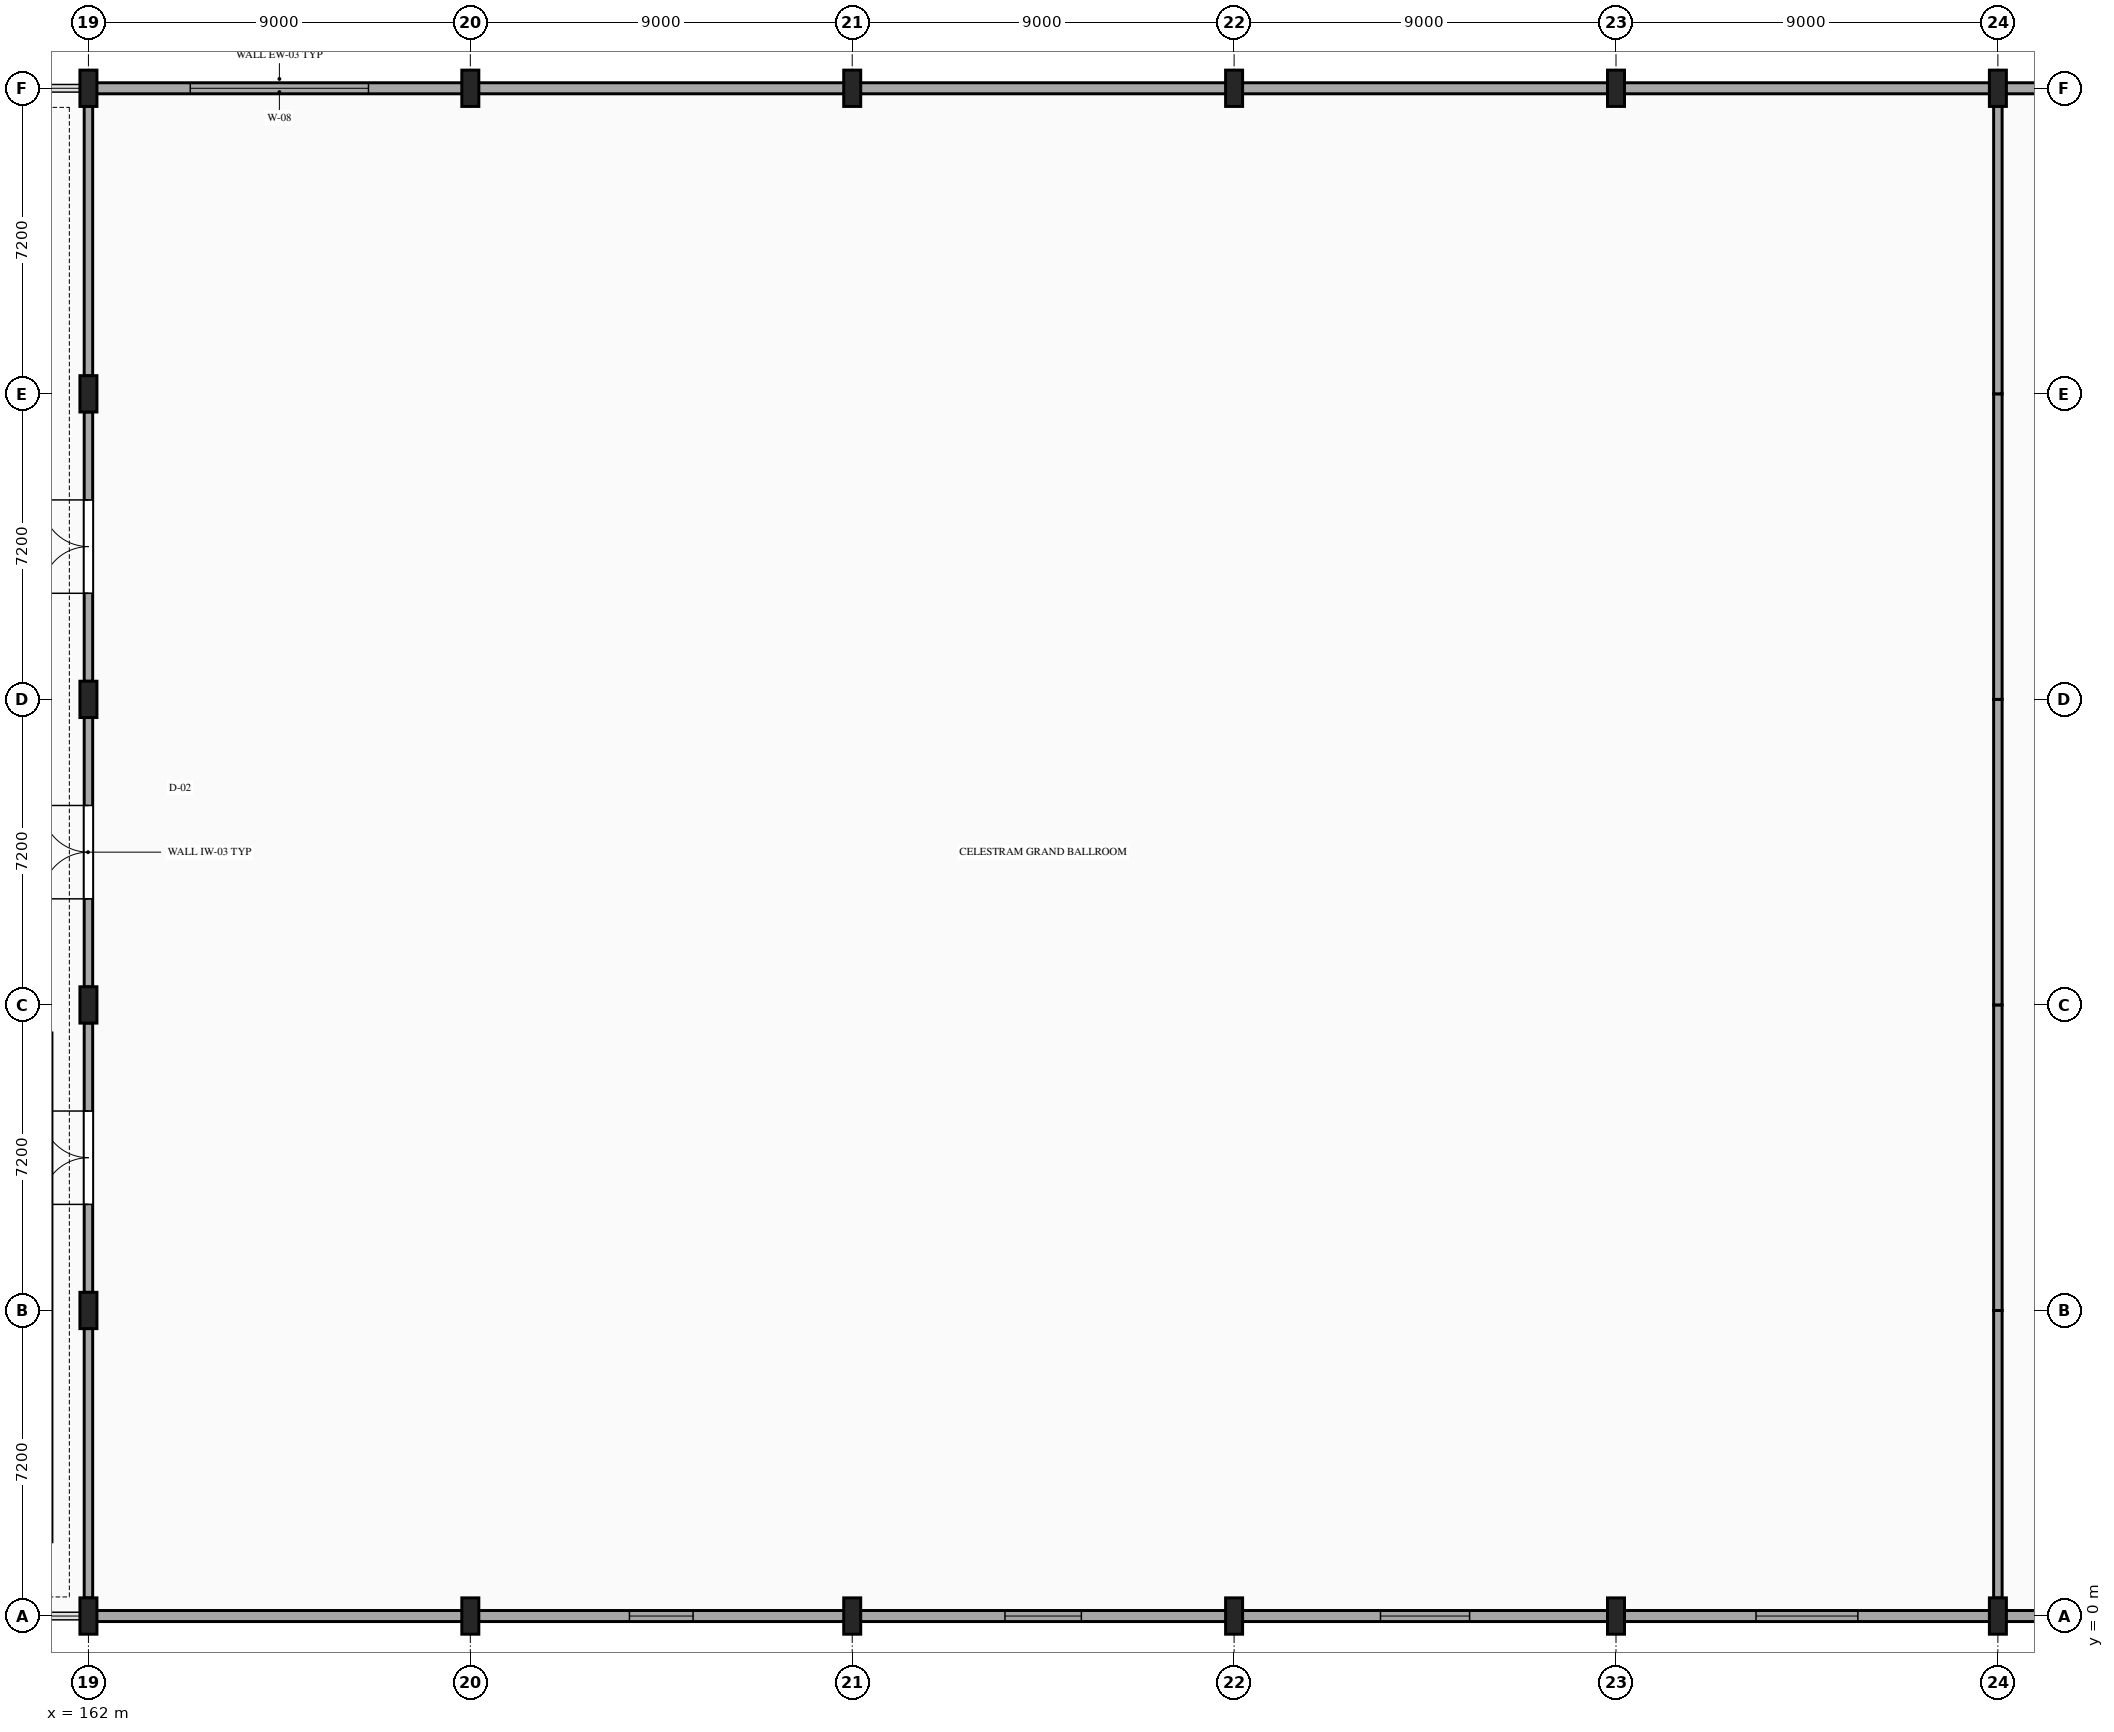
"""IFC4 building model, lengths in metres.
Left out: names, types, materials, properties, quantities, classifications, styles, units other than length and angle.
Written with IfcOpenShell. Run it as: python <this file> out.ifc"""

import sys

from ifc_helpers import new_model, si_unit, direction, frame, frame_2d, origin, origin_2d, place, context, subcontext, project, spatial, rectangle, i_section, extrude, element, fill, save


model = new_model("IFC4")
c1 = context("Model", 3, precision=1e-05, world=origin(), true_north=direction((0.0, 1.0)))
c2 = subcontext(c1, "Body", "Model", "MODEL_VIEW")
j1 = project(units=[si_unit("LENGTHUNIT", "METRE"), si_unit("PLANEANGLEUNIT", "RADIAN")], contexts=[c1])
p1 = place(None, origin())
s1 = spatial("IfcSite", under=j1, at=p1, CompositionType="ELEMENT")
p2 = place(p1, origin())
s2 = spatial("IfcBuilding", under=s1, at=p2, CompositionType="ELEMENT")
p3 = place(p2, frame((0.0, 0.0, 10.8)))
s3 = spatial("IfcBuildingStorey", under=s2, at=p3, CompositionType="ELEMENT", Elevation=10.8)
for number, where, z_axis, x_axis in (
    (1, (162.0, 0.0, 0.0), (0.0, 0.0, 1.0), (1.0, 0.0, 0.0)),
    (2, (162.0, 7.2, 0.0), (0.0, 0.0, 1.0), (1.0, 0.0, 0.0)),
    (3, (162.0, 14.4, 0.0), (0.0, 0.0, 1.0), (1.0, 0.0, 0.0)),
    (4, (162.0, 21.6, 0.0), (0.0, 0.0, 1.0), (1.0, 0.0, 0.0)),
    (5, (162.0, 28.8, 0.0), (0.0, 0.0, 1.0), (1.0, 0.0, 0.0)),
    (6, (162.0, 36.0, 0.0), (0.0, 0.0, 1.0), (1.0, 0.0, 0.0)),
    (7, (171.0, 0.0, 0.0), (0.0, 0.0, 1.0), (1.0, 0.0, 0.0)),
    (8, (171.0, 36.0, 0.0), (0.0, 0.0, 1.0), (1.0, 0.0, 0.0)),
    (9, (180.0, 0.0, 0.0), (0.0, 0.0, 1.0), (1.0, 0.0, 0.0)),
    (10, (180.0, 36.0, 0.0), (0.0, 0.0, 1.0), (1.0, 0.0, 0.0)),
    (11, (189.0, 0.0, 0.0), (0.0, 0.0, 1.0), (1.0, 0.0, 0.0)),
    (12, (189.0, 36.0, 0.0), (0.0, 0.0, 1.0), (1.0, 0.0, 0.0)),
    (13, (198.0, 0.0, 0.0), (0.0, 0.0, 1.0), (1.0, 0.0, 0.0)),
    (14, (198.0, 36.0, 0.0), (0.0, 0.0, 1.0), (1.0, 0.0, 0.0)),
    (15, (207.0, 0.0, 0.0), (0.0, 0.0, 1.0), (1.0, 0.0, 0.0)),
    (16, (207.0, 36.0, 0.0), (0.0, 0.0, 1.0), (1.0, 0.0, 0.0)),
):
    element("IfcColumn", number, at=place(p3, frame(where, z_axis=z_axis, x_axis=x_axis)), inside=s3, PredefinedType="COLUMN", context=c2, shape_type="SweptSolid", body=[
        extrude(i_section(OverallWidth=0.401, OverallDepth=0.856, WebThickness=0.018, FlangeThickness=0.029, at=origin_2d()), origin(), (0.0, 0.0, 1.0), 4.5),
    ])
p4 = place(p3, frame((160.97, 13.74, 0.0), z_axis=(0.0, 0.0, 1.0), x_axis=(0.0, -1.0, 0.0)))
e17 = element("IfcWall", 17, at=p4, inside=s3, PredefinedType="SHEAR", context=c2, shape_type="SweptSolid", body=[
    extrude(rectangle(XDim=11.99, YDim=0.34, at=frame_2d((5.995, 0.0))), origin(), (0.0, 0.0, 1.0), 4.26),
])
p5 = place(p3, frame((215.993, 0.0, 0.0), z_axis=(0.0, 0.0, 1.0), x_axis=(-1.0, 0.0, 0.0)))
e18 = element("IfcWall", 18, at=p5, inside=s3, PredefinedType="STANDARD", context=c2, shape_type="SweptSolid", body=[
    extrude(rectangle(XDim=8.986, YDim=0.26, at=frame_2d((4.493, 0.0))), origin(), (0.0, 0.0, 1.0), 3.336),
])
p6 = place(p5, frame((3.143, 0.0, 0.9)))
e19 = element("IfcOpeningElement", 19, at=p6, cuts=e18, PredefinedType="OPENING", context=c2, shape_type="SweptSolid", body=[
    extrude(rectangle(XDim=2.7, YDim=2.0, at=frame_2d((1.35, 1.0))), frame((0.0, 0.14, 0.0), z_axis=(0.0, -1.0, 0.0), x_axis=(1.0, 0.0, 0.0)), (0.0, 0.0, 1.0), 0.28),
])
p7 = place(p3, frame((206.993, 0.0, 0.0), z_axis=(0.0, 0.0, 1.0), x_axis=(-1.0, 0.0, 0.0)))
e20 = element("IfcWall", 20, at=p7, inside=s3, PredefinedType="STANDARD", context=c2, shape_type="SweptSolid", body=[
    extrude(rectangle(XDim=8.986, YDim=0.26, at=frame_2d((4.493, 0.0))), origin(), (0.0, 0.0, 1.0), 3.336),
])
p8 = place(p7, frame((3.293, 0.0, 0.9)))
e21 = element("IfcOpeningElement", 21, at=p8, cuts=e20, PredefinedType="OPENING", context=c2, shape_type="SweptSolid", body=[
    extrude(rectangle(XDim=2.4, YDim=2.0, at=frame_2d((1.2, 1.0))), frame((0.0, 0.14, 0.0), z_axis=(0.0, -1.0, 0.0), x_axis=(1.0, 0.0, 0.0)), (0.0, 0.0, 1.0), 0.28),
])
p9 = place(p3, frame((197.993, 0.0, 0.0), z_axis=(0.0, 0.0, 1.0), x_axis=(-1.0, 0.0, 0.0)))
e22 = element("IfcWall", 22, at=p9, inside=s3, PredefinedType="STANDARD", context=c2, shape_type="SweptSolid", body=[
    extrude(rectangle(XDim=8.986, YDim=0.26, at=frame_2d((4.493, 0.0))), origin(), (0.0, 0.0, 1.0), 3.336),
])
p10 = place(p9, frame((3.443, 0.0, 0.9)))
e23 = element("IfcOpeningElement", 23, at=p10, cuts=e22, PredefinedType="OPENING", context=c2, shape_type="SweptSolid", body=[
    extrude(rectangle(XDim=2.1, YDim=1.8, at=frame_2d((1.05, 0.9))), frame((0.0, 0.14, 0.0), z_axis=(0.0, -1.0, 0.0), x_axis=(1.0, 0.0, 0.0)), (0.0, 0.0, 1.0), 0.28),
])
p11 = place(p3, frame((188.993, 0.0, 0.0), z_axis=(0.0, 0.0, 1.0), x_axis=(-1.0, 0.0, 0.0)))
e24 = element("IfcWall", 24, at=p11, inside=s3, PredefinedType="STANDARD", context=c2, shape_type="SweptSolid", body=[
    extrude(rectangle(XDim=8.986, YDim=0.26, at=frame_2d((4.493, 0.0))), origin(), (0.0, 0.0, 1.0), 3.336),
])
p12 = place(p11, frame((3.593, 0.0, 0.9)))
e25 = element("IfcOpeningElement", 25, at=p12, cuts=e24, PredefinedType="OPENING", context=c2, shape_type="SweptSolid", body=[
    extrude(rectangle(XDim=1.8, YDim=1.8, at=frame_2d((0.9, 0.9))), frame((0.0, 0.14, 0.0), z_axis=(0.0, -1.0, 0.0), x_axis=(1.0, 0.0, 0.0)), (0.0, 0.0, 1.0), 0.28),
])
p13 = place(p3, frame((179.993, 0.0, 0.0), z_axis=(0.0, 0.0, 1.0), x_axis=(-1.0, 0.0, 0.0)))
e26 = element("IfcWall", 26, at=p13, inside=s3, PredefinedType="STANDARD", context=c2, shape_type="SweptSolid", body=[
    extrude(rectangle(XDim=8.986, YDim=0.26, at=frame_2d((4.493, 0.0))), origin(), (0.0, 0.0, 1.0), 3.336),
])
p14 = place(p13, frame((3.743, 0.0, 0.9)))
e27 = element("IfcOpeningElement", 27, at=p14, cuts=e26, PredefinedType="OPENING", context=c2, shape_type="SweptSolid", body=[
    extrude(rectangle(XDim=1.5, YDim=1.6, at=frame_2d((0.75, 0.8))), frame((0.0, 0.14, 0.0), z_axis=(0.0, -1.0, 0.0), x_axis=(1.0, 0.0, 0.0)), (0.0, 0.0, 1.0), 0.28),
])
p15 = place(p3, frame((170.993, 0.0, 0.0), z_axis=(0.0, 0.0, 1.0), x_axis=(-1.0, 0.0, 0.0)))
e28 = element("IfcWall", 28, at=p15, inside=s3, PredefinedType="STANDARD", context=c2, shape_type="SweptSolid", body=[
    extrude(rectangle(XDim=8.986, YDim=0.26, at=frame_2d((4.493, 0.0))), origin(), (0.0, 0.0, 1.0), 3.336),
])
p16 = place(p3, frame((162.007, 36.0, 0.0), z_axis=(0.0, 0.0, 1.0), x_axis=(1.0, 0.0, 0.0)))
e29 = element("IfcWall", 29, at=p16, inside=s3, PredefinedType="STANDARD", context=c2, shape_type="SweptSolid", body=[
    extrude(rectangle(XDim=8.986, YDim=0.26, at=frame_2d((4.493, 0.0))), origin(), (0.0, 0.0, 1.0), 3.336),
])
p17 = place(p16, frame((2.393, 0.0, 0.9)))
e30 = element("IfcOpeningElement", 30, at=p17, cuts=e29, PredefinedType="OPENING", context=c2, shape_type="SweptSolid", body=[
    extrude(rectangle(XDim=4.2, YDim=1.5, at=frame_2d((2.1, 0.75))), frame((0.0, 0.14, 0.0), z_axis=(0.0, -1.0, 0.0), x_axis=(1.0, 0.0, 0.0)), (0.0, 0.0, 1.0), 0.28),
])
for number, where, z_axis, x_axis in (
    (31, (171.007, 36.0, 0.0), (0.0, 0.0, 1.0), (1.0, 0.0, 0.0)),
    (32, (180.007, 36.0, 0.0), (0.0, 0.0, 1.0), (1.0, 0.0, 0.0)),
    (33, (189.007, 36.0, 0.0), (0.0, 0.0, 1.0), (1.0, 0.0, 0.0)),
    (34, (198.007, 36.0, 0.0), (0.0, 0.0, 1.0), (1.0, 0.0, 0.0)),
    (35, (207.007, 36.0, 0.0), (0.0, 0.0, 1.0), (1.0, 0.0, 0.0)),
):
    element("IfcWall", number, at=place(p3, frame(where, z_axis=z_axis, x_axis=x_axis)), inside=s3, PredefinedType="STANDARD", context=c2, shape_type="SweptSolid", body=[
        extrude(rectangle(XDim=8.986, YDim=0.26, at=frame_2d((4.493, 0.0))), origin(), (0.0, 0.0, 1.0), 3.336),
    ])
p18 = place(p3, frame((162.0, 0.426, 0.0), z_axis=(0.0, 0.0, 1.0), x_axis=(0.0, 1.0, 0.0)))
e36 = element("IfcWall", 36, at=p18, inside=s3, PredefinedType="PARTITIONING", context=c2, shape_type="SweptSolid", body=[
    extrude(rectangle(XDim=6.348, YDim=0.2, at=frame_2d((3.174, 0.0))), origin(), (0.0, 0.0, 1.0), 4.01),
])
p19 = place(p3, frame((162.0, 7.626, 0.0), z_axis=(0.0, 0.0, 1.0), x_axis=(0.0, 1.0, 0.0)))
e37 = element("IfcWall", 37, at=p19, inside=s3, PredefinedType="PARTITIONING", context=c2, shape_type="SweptSolid", body=[
    extrude(rectangle(XDim=6.348, YDim=0.2, at=frame_2d((3.174, 0.0))), origin(), (0.0, 0.0, 1.0), 4.01),
])
p20 = place(p19, frame((2.074, 0.0, 0.0)))
e38 = element("IfcOpeningElement", 38, at=p20, cuts=e37, PredefinedType="OPENING", context=c2, shape_type="SweptSolid", body=[
    extrude(rectangle(XDim=2.2, YDim=2.5, at=frame_2d((1.1, 1.25))), frame((0.0, 0.11, 0.0), z_axis=(0.0, -1.0, 0.0), x_axis=(1.0, 0.0, 0.0)), (0.0, 0.0, 1.0), 0.22),
])
p21 = place(p3, frame((162.0, 14.826, 0.0), z_axis=(0.0, 0.0, 1.0), x_axis=(0.0, 1.0, 0.0)))
e39 = element("IfcWall", 39, at=p21, inside=s3, PredefinedType="PARTITIONING", context=c2, shape_type="SweptSolid", body=[
    extrude(rectangle(XDim=6.348, YDim=0.2, at=frame_2d((3.174, 0.0))), origin(), (0.0, 0.0, 1.0), 4.01),
])
p22 = place(p21, frame((2.074, 0.0, 0.0)))
e40 = element("IfcOpeningElement", 40, at=p22, cuts=e39, PredefinedType="OPENING", context=c2, shape_type="SweptSolid", body=[
    extrude(rectangle(XDim=2.2, YDim=2.5, at=frame_2d((1.1, 1.25))), frame((0.0, 0.11, 0.0), z_axis=(0.0, -1.0, 0.0), x_axis=(1.0, 0.0, 0.0)), (0.0, 0.0, 1.0), 0.22),
])
p23 = place(p3, frame((162.0, 22.026, 0.0), z_axis=(0.0, 0.0, 1.0), x_axis=(0.0, 1.0, 0.0)))
e41 = element("IfcWall", 41, at=p23, inside=s3, PredefinedType="PARTITIONING", context=c2, shape_type="SweptSolid", body=[
    extrude(rectangle(XDim=6.348, YDim=0.2, at=frame_2d((3.174, 0.0))), origin(), (0.0, 0.0, 1.0), 4.01),
])
p24 = place(p23, frame((2.074, 0.0, 0.0)))
e42 = element("IfcOpeningElement", 42, at=p24, cuts=e41, PredefinedType="OPENING", context=c2, shape_type="SweptSolid", body=[
    extrude(rectangle(XDim=2.2, YDim=2.5, at=frame_2d((1.1, 1.25))), frame((0.0, 0.11, 0.0), z_axis=(0.0, -1.0, 0.0), x_axis=(1.0, 0.0, 0.0)), (0.0, 0.0, 1.0), 0.22),
])
p25 = place(p3, frame((162.0, 29.226, 0.0), z_axis=(0.0, 0.0, 1.0), x_axis=(0.0, 1.0, 0.0)))
e43 = element("IfcWall", 43, at=p25, inside=s3, PredefinedType="PARTITIONING", context=c2, shape_type="SweptSolid", body=[
    extrude(rectangle(XDim=6.348, YDim=0.2, at=frame_2d((3.174, 0.0))), origin(), (0.0, 0.0, 1.0), 4.01),
])
p26 = place(p3, frame((207.0, 0.426, 0.0), z_axis=(0.0, 0.0, 1.0), x_axis=(0.0, 1.0, 0.0)))
e44 = element("IfcWall", 44, at=p26, inside=s3, PredefinedType="PARTITIONING", context=c2, shape_type="SweptSolid", body=[
    extrude(rectangle(XDim=6.774, YDim=0.2, at=frame_2d((3.387, 0.0))), origin(), (0.0, 0.0, 1.0), 4.22),
])
p27 = place(p3, frame((207.0, 7.2, 0.0), z_axis=(0.0, 0.0, 1.0), x_axis=(0.0, 1.0, 0.0)))
e45 = element("IfcWall", 45, at=p27, inside=s3, PredefinedType="PARTITIONING", context=c2, shape_type="SweptSolid", body=[
    extrude(rectangle(XDim=7.2, YDim=0.2, at=frame_2d((3.6, 0.0))), origin(), (0.0, 0.0, 1.0), 4.22),
])
p28 = place(p3, frame((207.0, 14.4, 0.0), z_axis=(0.0, 0.0, 1.0), x_axis=(0.0, 1.0, 0.0)))
e46 = element("IfcWall", 46, at=p28, inside=s3, PredefinedType="PARTITIONING", context=c2, shape_type="SweptSolid", body=[
    extrude(rectangle(XDim=7.2, YDim=0.2, at=frame_2d((3.6, 0.0))), origin(), (0.0, 0.0, 1.0), 4.22),
])
p29 = place(p3, frame((207.0, 21.6, 0.0), z_axis=(0.0, 0.0, 1.0), x_axis=(0.0, 1.0, 0.0)))
e47 = element("IfcWall", 47, at=p29, inside=s3, PredefinedType="PARTITIONING", context=c2, shape_type="SweptSolid", body=[
    extrude(rectangle(XDim=7.2, YDim=0.2, at=frame_2d((3.6, 0.0))), origin(), (0.0, 0.0, 1.0), 4.22),
])
p30 = place(p3, frame((207.0, 28.8, 0.0), z_axis=(0.0, 0.0, 1.0), x_axis=(0.0, 1.0, 0.0)))
e48 = element("IfcWall", 48, at=p30, inside=s3, PredefinedType="PARTITIONING", context=c2, shape_type="SweptSolid", body=[
    extrude(rectangle(XDim=6.774, YDim=0.2, at=frame_2d((3.387, 0.0))), origin(), (0.0, 0.0, 1.0), 4.22),
])
p31 = place(p8, origin())
e49 = element("IfcWindow", 49, at=p31, inside=s3, PartitioningType="SINGLE_PANEL", PredefinedType="WINDOW", context=c2, shape_type="SweptSolid", body=[
    extrude(rectangle(XDim=2.4, YDim=2.0, at=frame_2d((1.2, 1.0))), frame((0.0, 0.03, 0.0), z_axis=(0.0, -1.0, 0.0), x_axis=(1.0, 0.0, 0.0)), (0.0, 0.0, 1.0), 0.06),
])
fill(e21, e49)
p32 = place(p10, origin())
e50 = element("IfcWindow", 50, at=p32, inside=s3, PartitioningType="SINGLE_PANEL", PredefinedType="WINDOW", context=c2, shape_type="SweptSolid", body=[
    extrude(rectangle(XDim=2.1, YDim=1.8, at=frame_2d((1.05, 0.9))), frame((0.0, 0.03, 0.0), z_axis=(0.0, -1.0, 0.0), x_axis=(1.0, 0.0, 0.0)), (0.0, 0.0, 1.0), 0.06),
])
fill(e23, e50)
p33 = place(p12, origin())
e51 = element("IfcWindow", 51, at=p33, inside=s3, PartitioningType="SINGLE_PANEL", PredefinedType="WINDOW", context=c2, shape_type="SweptSolid", body=[
    extrude(rectangle(XDim=1.8, YDim=1.8, at=frame_2d((0.9, 0.9))), frame((0.0, 0.03, 0.0), z_axis=(0.0, -1.0, 0.0), x_axis=(1.0, 0.0, 0.0)), (0.0, 0.0, 1.0), 0.06),
])
fill(e25, e51)
p34 = place(p14, origin())
e52 = element("IfcWindow", 52, at=p34, inside=s3, PartitioningType="SINGLE_PANEL", PredefinedType="WINDOW", context=c2, shape_type="SweptSolid", body=[
    extrude(rectangle(XDim=1.5, YDim=1.6, at=frame_2d((0.75, 0.8))), frame((0.0, 0.03, 0.0), z_axis=(0.0, -1.0, 0.0), x_axis=(1.0, 0.0, 0.0)), (0.0, 0.0, 1.0), 0.06),
])
fill(e27, e52)
p35 = place(p17, origin())
e53 = element("IfcWindow", 53, at=p35, inside=s3, PartitioningType="SINGLE_PANEL", PredefinedType="WINDOW", context=c2, shape_type="SweptSolid", body=[
    extrude(rectangle(XDim=4.2, YDim=1.5, at=frame_2d((2.1, 0.75))), frame((0.0, 0.03, 0.0), z_axis=(0.0, -1.0, 0.0), x_axis=(1.0, 0.0, 0.0)), (0.0, 0.0, 1.0), 0.06),
])
fill(e30, e53)
p36 = place(p20, origin())
e54 = element("IfcDoor", 54, at=p36, inside=s3, OperationType="DOUBLE_DOOR_SINGLE_SWING", PredefinedType="DOOR", context=c2, shape_type="SweptSolid", body=[
    extrude(rectangle(XDim=2.2, YDim=2.5, at=frame_2d((1.1, 1.25))), frame((0.0, 0.025, 0.0), z_axis=(0.0, -1.0, 0.0), x_axis=(1.0, 0.0, 0.0)), (0.0, 0.0, 1.0), 0.05),
])
fill(e38, e54)
p37 = place(p22, origin())
e55 = element("IfcDoor", 55, at=p37, inside=s3, OperationType="DOUBLE_DOOR_SINGLE_SWING", PredefinedType="DOOR", context=c2, shape_type="SweptSolid", body=[
    extrude(rectangle(XDim=2.2, YDim=2.5, at=frame_2d((1.1, 1.25))), frame((0.0, 0.025, 0.0), z_axis=(0.0, -1.0, 0.0), x_axis=(1.0, 0.0, 0.0)), (0.0, 0.0, 1.0), 0.05),
])
fill(e40, e55)
p38 = place(p24, origin())
e56 = element("IfcDoor", 56, at=p38, inside=s3, OperationType="DOUBLE_DOOR_SINGLE_SWING", PredefinedType="DOOR", context=c2, shape_type="SweptSolid", body=[
    extrude(rectangle(XDim=2.2, YDim=2.5, at=frame_2d((1.1, 1.25))), frame((0.0, 0.025, 0.0), z_axis=(0.0, -1.0, 0.0), x_axis=(1.0, 0.0, 0.0)), (0.0, 0.0, 1.0), 0.05),
])
fill(e42, e56)
save(model, sys.argv[1])
